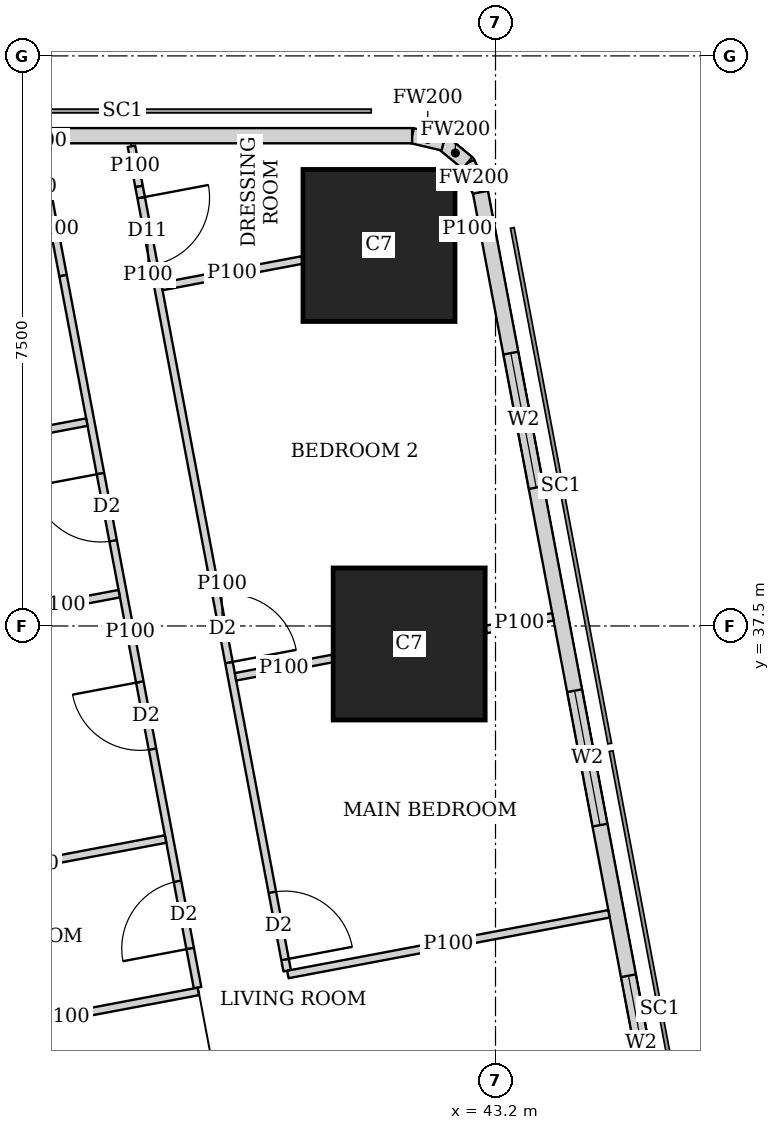
"""IFC4 building model, lengths in metres.
Left out: names, types, materials, properties, quantities, classifications, styles, units other than length and angle.
Written with IfcOpenShell. Run it as: python <this file> out.ifc"""

import sys

from ifc_helpers import new_model, si_unit, direction, frame, frame_2d, origin, origin_2d, place, context, subcontext, project, spatial, rectangle, extrude, element, fill, save


model = new_model("IFC4")
c1 = context("Model", 3, precision=1e-05, world=origin(), true_north=direction((0.0, 1.0)))
c2 = subcontext(c1, "Body", "Model", "MODEL_VIEW")
j1 = project(units=[si_unit("LENGTHUNIT", "METRE"), si_unit("PLANEANGLEUNIT", "RADIAN")], contexts=[c1])
p1 = place(None, origin())
s1 = spatial("IfcSite", under=j1, at=p1, CompositionType="ELEMENT")
p2 = place(p1, origin())
s2 = spatial("IfcBuilding", under=s1, at=p2, CompositionType="ELEMENT")
p3 = place(p2, frame((0.0, 0.0, 277.85)))
s3 = spatial("IfcBuildingStorey", under=s2, at=p3, CompositionType="ELEMENT", Elevation=277.85)
for number, where, z_axis, x_axis in (
    (1, (42.064, 37.263, 0.0), (0.0, 0.0, 1.0), (1.0, 0.0, 0.0)),
    (2, (41.667, 42.506, 0.0), (0.0, 0.0, 1.0), (1.0, 0.0, 0.0)),
):
    element("IfcColumn", number, at=place(p3, frame(where, z_axis=z_axis, x_axis=x_axis)), inside=s3, PredefinedType="COLUMN", context=c2, shape_type="SweptSolid", body=[
        extrude(rectangle(XDim=2.0, YDim=2.0, at=origin_2d()), origin(), (0.0, 0.0, 1.0), 3.75),
    ])
p4 = place(p3, frame((49.684, 7.832, 0.0), z_axis=(0.0, 0.0, 1.0), x_axis=(-0.185616669694, 0.982622232565, 0.0)))
e3 = element("IfcWall", 3, at=p4, inside=s3, PredefinedType="SOLIDWALL", context=c2, shape_type="SweptSolid", body=[
    extrude(rectangle(XDim=36.0, YDim=0.2, at=frame_2d((18.0, 0.0))), origin(), (0.0, 0.0, 1.0), 3.5),
])
p5 = place(p4, frame((2.518, 0.0, 0.9)))
e4 = element("IfcOpeningElement", 4, at=p5, cuts=e3, PredefinedType="OPENING", context=c2, shape_type="SweptSolid", body=[
    extrude(rectangle(XDim=2.4, YDim=1.5, at=frame_2d((1.2, 0.75))), frame((0.0, 0.11, 0.0), z_axis=(0.0, -1.0, 0.0), x_axis=(1.0, 0.0, 0.0)), (0.0, 0.0, 1.0), 0.22),
])
p6 = place(p4, frame((8.444, 0.0, 0.9)))
e5 = element("IfcOpeningElement", 5, at=p6, cuts=e3, PredefinedType="OPENING", context=c2, shape_type="SweptSolid", body=[
    extrude(rectangle(XDim=1.8, YDim=1.5, at=frame_2d((0.9, 0.75))), frame((0.0, 0.11, 0.0), z_axis=(0.0, -1.0, 0.0), x_axis=(1.0, 0.0, 0.0)), (0.0, 0.0, 1.0), 0.22),
])
p7 = place(p4, frame((12.261, 0.0, 0.9)))
e6 = element("IfcOpeningElement", 6, at=p7, cuts=e3, PredefinedType="OPENING", context=c2, shape_type="SweptSolid", body=[
    extrude(rectangle(XDim=1.8, YDim=1.5, at=frame_2d((0.9, 0.75))), frame((0.0, 0.11, 0.0), z_axis=(0.0, -1.0, 0.0), x_axis=(1.0, 0.0, 0.0)), (0.0, 0.0, 1.0), 0.22),
])
p8 = place(p4, frame((16.078, 0.0, 0.9)))
e7 = element("IfcOpeningElement", 7, at=p8, cuts=e3, PredefinedType="OPENING", context=c2, shape_type="SweptSolid", body=[
    extrude(rectangle(XDim=1.8, YDim=1.5, at=frame_2d((0.9, 0.75))), frame((0.0, 0.11, 0.0), z_axis=(0.0, -1.0, 0.0), x_axis=(1.0, 0.0, 0.0)), (0.0, 0.0, 1.0), 0.22),
])
p9 = place(p4, frame((19.894, 0.0, 0.9)))
e8 = element("IfcOpeningElement", 8, at=p9, cuts=e3, PredefinedType="OPENING", context=c2, shape_type="SweptSolid", body=[
    extrude(rectangle(XDim=1.8, YDim=1.5, at=frame_2d((0.9, 0.75))), frame((0.0, 0.11, 0.0), z_axis=(0.0, -1.0, 0.0), x_axis=(1.0, 0.0, 0.0)), (0.0, 0.0, 1.0), 0.22),
])
p10 = place(p4, frame((23.71, 0.0, 0.9)))
e9 = element("IfcOpeningElement", 9, at=p10, cuts=e3, PredefinedType="OPENING", context=c2, shape_type="SweptSolid", body=[
    extrude(rectangle(XDim=1.8, YDim=1.5, at=frame_2d((0.9, 0.75))), frame((0.0, 0.11, 0.0), z_axis=(0.0, -1.0, 0.0), x_axis=(1.0, 0.0, 0.0)), (0.0, 0.0, 1.0), 0.22),
])
p11 = place(p4, frame((27.526, 0.0, 0.9)))
e10 = element("IfcOpeningElement", 10, at=p11, cuts=e3, PredefinedType="OPENING", context=c2, shape_type="SweptSolid", body=[
    extrude(rectangle(XDim=1.8, YDim=1.5, at=frame_2d((0.9, 0.75))), frame((0.0, 0.11, 0.0), z_axis=(0.0, -1.0, 0.0), x_axis=(1.0, 0.0, 0.0)), (0.0, 0.0, 1.0), 0.22),
])
p12 = place(p4, frame((32.046, 0.0, 0.9)))
e11 = element("IfcOpeningElement", 11, at=p12, cuts=e3, PredefinedType="OPENING", context=c2, shape_type="SweptSolid", body=[
    extrude(rectangle(XDim=1.8, YDim=1.5, at=frame_2d((0.9, 0.75))), frame((0.0, 0.11, 0.0), z_axis=(0.0, -1.0, 0.0), x_axis=(1.0, 0.0, 0.0)), (0.0, 0.0, 1.0), 0.22),
])
p13 = place(p3, frame((43.002, 43.206, 0.0), z_axis=(0.0, 0.0, 1.0), x_axis=(-0.40678170573, 0.913525393124, 0.0)))
e12 = element("IfcWall", 12, at=p13, inside=s3, PredefinedType="SOLIDWALL", context=c2, shape_type="SweptSolid", body=[
    extrude(rectangle(XDim=0.423, YDim=0.2, at=frame_2d((0.211, 0.0))), origin(), (0.0, 0.0, 1.0), 3.5),
])
p14 = place(p3, frame((42.83, 43.592, 0.0), z_axis=(0.0, 0.0, 1.0), x_axis=(-0.771190539797, 0.636604391539, 0.0)))
e13 = element("IfcWall", 13, at=p14, inside=s3, PredefinedType="SOLIDWALL", context=c2, shape_type="SweptSolid", body=[
    extrude(rectangle(XDim=0.41, YDim=0.2, at=frame_2d((0.205, 0.0))), origin(), (0.0, 0.0, 1.0), 3.5),
])
p15 = place(p3, frame((42.514, 43.853, 0.0), z_axis=(0.0, 0.0, 1.0), x_axis=(-0.973288080424, 0.229587265555, 0.0)))
e14 = element("IfcWall", 14, at=p15, inside=s3, PredefinedType="SOLIDWALL", context=c2, shape_type="SweptSolid", body=[
    extrude(rectangle(XDim=0.422, YDim=0.2, at=frame_2d((0.211, 0.0))), origin(), (0.0, 0.0, 1.0), 3.5),
])
p16 = place(p3, frame((42.103, 43.95, 0.0), z_axis=(0.0, 0.0, 1.0), x_axis=(-1.0, 0.0, 0.0)))
e15 = element("IfcWall", 15, at=p16, inside=s3, PredefinedType="SOLIDWALL", context=c2, shape_type="SweptSolid", body=[
    extrude(rectangle(XDim=27.54, YDim=0.2, at=frame_2d((13.77, 0.0))), origin(), (0.0, 0.0, 1.0), 3.5),
])
p17 = place(p16, frame((10.603, 0.0, 0.9)))
e16 = element("IfcOpeningElement", 16, at=p17, cuts=e15, PredefinedType="OPENING", context=c2, shape_type="SweptSolid", body=[
    extrude(rectangle(XDim=1.8, YDim=1.5, at=frame_2d((0.9, 0.75))), frame((0.0, 0.11, 0.0), z_axis=(0.0, -1.0, 0.0), x_axis=(1.0, 0.0, 0.0)), (0.0, 0.0, 1.0), 0.22),
])
p18 = place(p16, frame((14.203, 0.0, 0.9)))
e17 = element("IfcOpeningElement", 17, at=p18, cuts=e15, PredefinedType="OPENING", context=c2, shape_type="SweptSolid", body=[
    extrude(rectangle(XDim=1.8, YDim=1.5, at=frame_2d((0.9, 0.75))), frame((0.0, 0.11, 0.0), z_axis=(0.0, -1.0, 0.0), x_axis=(1.0, 0.0, 0.0)), (0.0, 0.0, 1.0), 0.22),
])
p19 = place(p16, frame((17.803, 0.0, 0.9)))
e18 = element("IfcOpeningElement", 18, at=p19, cuts=e15, PredefinedType="OPENING", context=c2, shape_type="SweptSolid", body=[
    extrude(rectangle(XDim=1.8, YDim=1.5, at=frame_2d((0.9, 0.75))), frame((0.0, 0.11, 0.0), z_axis=(0.0, -1.0, 0.0), x_axis=(1.0, 0.0, 0.0)), (0.0, 0.0, 1.0), 0.22),
])
p20 = place(p16, frame((22.822, 0.0, 0.9)))
e19 = element("IfcOpeningElement", 19, at=p20, cuts=e15, PredefinedType="OPENING", context=c2, shape_type="SweptSolid", body=[
    extrude(rectangle(XDim=2.4, YDim=1.5, at=frame_2d((1.2, 0.75))), frame((0.0, 0.11, 0.0), z_axis=(0.0, -1.0, 0.0), x_axis=(1.0, 0.0, 0.0)), (0.0, 0.0, 1.0), 0.22),
])
p21 = place(p3, frame((33.781, 42.186, 0.0), z_axis=(0.0, 0.0, 1.0), x_axis=(0.185593518645, -0.9826266055, 0.0)))
e20 = element("IfcWall", 20, at=p21, inside=s3, PredefinedType="SOLIDWALL", context=c2, shape_type="SweptSolid", body=[
    extrude(rectangle(XDim=35.961, YDim=0.15, at=frame_2d((17.98, 0.0))), origin(), (0.0, 0.0, 1.0), 2.5),
])
p22 = place(p21, frame((11.76, 0.0, 0.0)))
e21 = element("IfcOpeningElement", 21, at=p22, cuts=e20, PredefinedType="OPENING", context=c2, shape_type="SweptSolid", body=[
    extrude(rectangle(XDim=1.0, YDim=2.1, at=frame_2d((0.5, 1.05))), frame((0.0, 0.085, 0.0), z_axis=(0.0, -1.0, 0.0), x_axis=(1.0, 0.0, 0.0)), (0.0, 0.0, 1.0), 0.17),
])
p23 = place(p21, frame((15.576, 0.0, 0.0)))
e22 = element("IfcOpeningElement", 22, at=p23, cuts=e20, PredefinedType="OPENING", context=c2, shape_type="SweptSolid", body=[
    extrude(rectangle(XDim=1.0, YDim=2.1, at=frame_2d((0.5, 1.05))), frame((0.0, 0.085, 0.0), z_axis=(0.0, -1.0, 0.0), x_axis=(1.0, 0.0, 0.0)), (0.0, 0.0, 1.0), 0.17),
])
p24 = place(p21, frame((30.502, 0.0, 0.0)))
e23 = element("IfcOpeningElement", 23, at=p24, cuts=e20, PredefinedType="OPENING", context=c2, shape_type="SweptSolid", body=[
    extrude(rectangle(XDim=1.0, YDim=2.1, at=frame_2d((0.5, 1.05))), frame((0.0, 0.085, 0.0), z_axis=(0.0, -1.0, 0.0), x_axis=(1.0, 0.0, 0.0)), (0.0, 0.0, 1.0), 0.17),
])
p25 = place(p3, frame((38.41, 43.811, 0.0), z_axis=(0.0, 0.0, 1.0), x_axis=(0.185903499302, -0.982568007289, 0.0)))
e24 = element("IfcWall", 24, at=p25, inside=s3, PredefinedType="PARTITIONING", context=c2, shape_type="SweptSolid", body=[
    extrude(rectangle(XDim=0.538, YDim=0.1, at=frame_2d((0.269, 0.0))), origin(), (0.0, 0.0, 1.0), 3.5),
])
p26 = place(p3, frame((38.51, 43.282, 0.0), z_axis=(0.0, 0.0, 1.0), x_axis=(0.185775287495, -0.982592256511, 0.0)))
e25 = element("IfcWall", 25, at=p26, inside=s3, PredefinedType="PARTITIONING", context=c2, shape_type="SweptSolid", body=[
    extrude(rectangle(XDim=1.259, YDim=0.1, at=frame_2d((0.629, 0.0))), origin(), (0.0, 0.0, 1.0), 2.05),
])
p27 = place(p26, frame((0.15, 0.0, 0.0)))
e26 = element("IfcOpeningElement", 26, at=p27, cuts=e25, PredefinedType="OPENING", context=c2, shape_type="SweptSolid", body=[
    extrude(rectangle(XDim=0.9, YDim=2.0, at=frame_2d((0.45, 1.0))), frame((0.0, 0.06, 0.0), z_axis=(0.0, -1.0, 0.0), x_axis=(1.0, 0.0, 0.0)), (0.0, 0.0, 1.0), 0.12),
])
p28 = place(p3, frame((38.744, 42.045, 0.0), z_axis=(0.0, 0.0, 1.0), x_axis=(0.185588352162, -0.982627581305, 0.0)))
e27 = element("IfcWall", 27, at=p28, inside=s3, PredefinedType="PARTITIONING", context=c2, shape_type="SweptSolid", body=[
    extrude(rectangle(XDim=9.241, YDim=0.1, at=frame_2d((4.621, 0.0))), origin(), (0.0, 0.0, 1.0), 3.5),
])
p29 = place(p28, frame((8.191, 0.0, 0.0)))
e28 = element("IfcOpeningElement", 28, at=p29, cuts=e27, PredefinedType="OPENING", context=c2, shape_type="SweptSolid", body=[
    extrude(rectangle(XDim=0.9, YDim=2.1, at=frame_2d((0.45, 1.05))), frame((0.0, 0.06, 0.0), z_axis=(0.0, -1.0, 0.0), x_axis=(1.0, 0.0, 0.0)), (0.0, 0.0, 1.0), 0.12),
])
p30 = place(p28, frame((4.215, 0.0, 0.0)))
e29 = element("IfcOpeningElement", 29, at=p30, cuts=e27, PredefinedType="OPENING", context=c2, shape_type="SweptSolid", body=[
    extrude(rectangle(XDim=0.9, YDim=2.1, at=frame_2d((0.45, 1.05))), frame((0.0, 0.06, 0.0), z_axis=(0.0, -1.0, 0.0), x_axis=(1.0, 0.0, 0.0)), (0.0, 0.0, 1.0), 0.12),
])
p31 = place(p3, frame((37.276, 43.346, 0.0), z_axis=(0.0, 0.0, 1.0), x_axis=(0.185962504646, -0.982556841544, 0.0)))
e30 = element("IfcWall", 30, at=p31, inside=s3, PredefinedType="PARTITIONING", context=c2, shape_type="SweptSolid", body=[
    extrude(rectangle(XDim=1.259, YDim=0.1, at=frame_2d((0.629, 0.0))), origin(), (0.0, 0.0, 1.0), 2.05),
])
p32 = place(p3, frame((37.51, 42.109, 0.0), z_axis=(0.0, 0.0, 1.0), x_axis=(0.185659798122, -0.982614084654, 0.0)))
e31 = element("IfcWall", 31, at=p32, inside=s3, PredefinedType="PARTITIONING", context=c2, shape_type="SweptSolid", body=[
    extrude(rectangle(XDim=9.534, YDim=0.1, at=frame_2d((4.767, 0.0))), origin(), (0.0, 0.0, 1.0), 3.5),
])
p33 = place(p32, frame((8.109, 0.0, 0.0)))
e32 = element("IfcOpeningElement", 32, at=p33, cuts=e31, PredefinedType="OPENING", context=c2, shape_type="SweptSolid", body=[
    extrude(rectangle(XDim=0.9, YDim=2.1, at=frame_2d((0.45, 1.05))), frame((0.0, 0.06, 0.0), z_axis=(0.0, -1.0, 0.0), x_axis=(1.0, 0.0, 0.0)), (0.0, 0.0, 1.0), 0.12),
])
p34 = place(p32, frame((2.65, 0.0, 0.0)))
e33 = element("IfcOpeningElement", 33, at=p34, cuts=e31, PredefinedType="OPENING", context=c2, shape_type="SweptSolid", body=[
    extrude(rectangle(XDim=0.9, YDim=2.1, at=frame_2d((0.45, 1.05))), frame((0.0, 0.06, 0.0), z_axis=(0.0, -1.0, 0.0), x_axis=(1.0, 0.0, 0.0)), (0.0, 0.0, 1.0), 0.12),
])
p35 = place(p32, frame((5.44, 0.0, 0.0)))
e34 = element("IfcOpeningElement", 34, at=p35, cuts=e31, PredefinedType="OPENING", context=c2, shape_type="SweptSolid", body=[
    extrude(rectangle(XDim=0.9, YDim=2.1, at=frame_2d((0.45, 1.05))), frame((0.0, 0.06, 0.0), z_axis=(0.0, -1.0, 0.0), x_axis=(1.0, 0.0, 0.0)), (0.0, 0.0, 1.0), 0.12),
])
p36 = place(p3, frame((42.985, 42.755, 0.0), z_axis=(0.0, 0.0, 1.0), x_axis=(-0.98281924824, -0.184570651215, 0.0)))
e35 = element("IfcWall", 35, at=p36, inside=s3, PredefinedType="PARTITIONING", context=c2, shape_type="SweptSolid", body=[
    extrude(rectangle(XDim=0.313, YDim=0.1, at=frame_2d((0.157, 0.0))), origin(), (0.0, 0.0, 1.0), 3.5),
])
p37 = place(p3, frame((40.657, 42.315, 0.0), z_axis=(0.0, 0.0, 1.0), x_axis=(-0.982640672055, -0.185519027661, 0.0)))
e36 = element("IfcWall", 36, at=p37, inside=s3, PredefinedType="PARTITIONING", context=c2, shape_type="SweptSolid", body=[
    extrude(rectangle(XDim=1.881, YDim=0.1, at=frame_2d((0.94, 0.0))), origin(), (0.0, 0.0, 1.0), 2.05),
])
p38 = place(p3, frame((43.955, 37.62, 0.0), z_axis=(0.0, 0.0, 1.0), x_axis=(-0.982708424405, -0.18515980288, 0.0)))
e37 = element("IfcWall", 37, at=p38, inside=s3, PredefinedType="PARTITIONING", context=c2, shape_type="SweptSolid", body=[
    extrude(rectangle(XDim=0.897, YDim=0.1, at=frame_2d((0.448, 0.0))), origin(), (0.0, 0.0, 1.0), 3.5),
])
p39 = place(p3, frame((41.054, 37.072, 0.0), z_axis=(0.0, 0.0, 1.0), x_axis=(-0.982602741717, -0.185719821156, 0.0)))
e38 = element("IfcWall", 38, at=p39, inside=s3, PredefinedType="PARTITIONING", context=c2, shape_type="SweptSolid", body=[
    extrude(rectangle(XDim=1.297, YDim=0.1, at=frame_2d((0.649, 0.0))), origin(), (0.0, 0.0, 1.0), 3.5),
])
p40 = place(p3, frame((44.693, 33.713, 0.0), z_axis=(0.0, 0.0, 1.0), x_axis=(-0.982633535512, -0.185556823879, 0.0)))
e39 = element("IfcWall", 39, at=p40, inside=s3, PredefinedType="PARTITIONING", context=c2, shape_type="SweptSolid", body=[
    extrude(rectangle(XDim=4.3, YDim=0.1, at=frame_2d((2.15, 0.0))), origin(), (0.0, 0.0, 1.0), 2.5),
])
p41 = place(p3, frame((37.823, 40.182, 0.0), z_axis=(0.0, 0.0, 1.0), x_axis=(-0.98263926043, -0.185526504472, 0.0)))
e40 = element("IfcWall", 40, at=p41, inside=s3, PredefinedType="PARTITIONING", context=c2, shape_type="SweptSolid", body=[
    extrude(rectangle(XDim=3.524, YDim=0.1, at=frame_2d((1.762, 0.0))), origin(), (0.0, 0.0, 1.0), 3.5),
])
p42 = place(p3, frame((38.25, 37.925, 0.0), z_axis=(0.0, 0.0, 1.0), x_axis=(-0.982610209589, -0.185680305934, 0.0)))
e41 = element("IfcWall", 41, at=p42, inside=s3, PredefinedType="PARTITIONING", context=c2, shape_type="SweptSolid", body=[
    extrude(rectangle(XDim=1.567, YDim=0.1, at=frame_2d((0.784, 0.0))), origin(), (0.0, 0.0, 1.0), 3.5),
])
p43 = place(p3, frame((39.289, 32.692, 0.0), z_axis=(0.0, 0.0, 1.0), x_axis=(-0.982662827464, -0.185401638399, 0.0)))
e42 = element("IfcWall", 42, at=p43, inside=s3, PredefinedType="PARTITIONING", context=c2, shape_type="SweptSolid", body=[
    extrude(rectangle(XDim=3.575, YDim=0.1, at=frame_2d((1.788, 0.0))), origin(), (0.0, 0.0, 1.0), 3.5),
])
p44 = place(p3, frame((38.859, 34.697, 0.0), z_axis=(0.0, 0.0, 1.0), x_axis=(-0.982626628545, -0.185593396635, 0.0)))
e43 = element("IfcWall", 43, at=p44, inside=s3, PredefinedType="PARTITIONING", context=c2, shape_type="SweptSolid", body=[
    extrude(rectangle(XDim=3.524, YDim=0.1, at=frame_2d((1.762, 0.0))), origin(), (0.0, 0.0, 1.0), 3.5),
])
p45 = place(p3, frame((37.947, 10.163, 0.0), z_axis=(0.0, 0.0, 1.0), x_axis=(-0.185572770922, 0.982630523998, 0.0)))
e44 = element("IfcWall", 44, at=p45, inside=s3, PredefinedType="PARTITIONING", context=c2, shape_type="SweptSolid", body=[
    extrude(rectangle(XDim=25.111, YDim=0.125, at=frame_2d((12.556, 0.0))), origin(), (0.0, 0.0, 1.0), 2.5),
])
p46 = place(p45, frame((0.708, 0.0, 0.0)))
e45 = element("IfcOpeningElement", 45, at=p46, cuts=e44, PredefinedType="OPENING", context=c2, shape_type="SweptSolid", body=[
    extrude(rectangle(XDim=1.0, YDim=2.1, at=frame_2d((0.5, 1.05))), frame((0.0, 0.073, 0.0), z_axis=(0.0, -1.0, 0.0), x_axis=(1.0, 0.0, 0.0)), (0.0, 0.0, 1.0), 0.145),
])
p47 = place(p45, frame((5.9, 0.0, 0.0)))
e46 = element("IfcOpeningElement", 46, at=p47, cuts=e44, PredefinedType="OPENING", context=c2, shape_type="SweptSolid", body=[
    extrude(rectangle(XDim=1.0, YDim=2.1, at=frame_2d((0.5, 1.05))), frame((0.0, 0.073, 0.0), z_axis=(0.0, -1.0, 0.0), x_axis=(1.0, 0.0, 0.0)), (0.0, 0.0, 1.0), 0.145),
])
p48 = place(p45, frame((13.378, 0.0, 0.0)))
e47 = element("IfcOpeningElement", 47, at=p48, cuts=e44, PredefinedType="OPENING", context=c2, shape_type="SweptSolid", body=[
    extrude(rectangle(XDim=1.0, YDim=2.1, at=frame_2d((0.5, 1.05))), frame((0.0, 0.073, 0.0), z_axis=(0.0, -1.0, 0.0), x_axis=(1.0, 0.0, 0.0)), (0.0, 0.0, 1.0), 0.145),
])
p49 = place(p45, frame((21.15, 0.0, 0.0)))
e48 = element("IfcOpeningElement", 48, at=p49, cuts=e44, PredefinedType="OPENING", context=c2, shape_type="SweptSolid", body=[
    extrude(rectangle(XDim=1.0, YDim=2.1, at=frame_2d((0.5, 1.05))), frame((0.0, 0.073, 0.0), z_axis=(0.0, -1.0, 0.0), x_axis=(1.0, 0.0, 0.0)), (0.0, 0.0, 1.0), 0.145),
])
p50 = place(p10, origin())
e49 = element("IfcWindow", 49, at=p50, inside=s3, PartitioningType="SINGLE_PANEL", PredefinedType="WINDOW", context=c2, shape_type="SweptSolid", body=[
    extrude(rectangle(XDim=1.8, YDim=1.5, at=frame_2d((0.9, 0.75))), frame((0.0, 0.03, 0.0), z_axis=(0.0, -1.0, 0.0), x_axis=(1.0, 0.0, 0.0)), (0.0, 0.0, 1.0), 0.06),
])
fill(e9, e49)
p51 = place(p11, origin())
e50 = element("IfcWindow", 50, at=p51, inside=s3, PartitioningType="SINGLE_PANEL", PredefinedType="WINDOW", context=c2, shape_type="SweptSolid", body=[
    extrude(rectangle(XDim=1.8, YDim=1.5, at=frame_2d((0.9, 0.75))), frame((0.0, 0.03, 0.0), z_axis=(0.0, -1.0, 0.0), x_axis=(1.0, 0.0, 0.0)), (0.0, 0.0, 1.0), 0.06),
])
fill(e10, e50)
p52 = place(p12, origin())
e51 = element("IfcWindow", 51, at=p52, inside=s3, PartitioningType="SINGLE_PANEL", PredefinedType="WINDOW", context=c2, shape_type="SweptSolid", body=[
    extrude(rectangle(XDim=1.8, YDim=1.5, at=frame_2d((0.9, 0.75))), frame((0.0, 0.03, 0.0), z_axis=(0.0, -1.0, 0.0), x_axis=(1.0, 0.0, 0.0)), (0.0, 0.0, 1.0), 0.06),
])
fill(e11, e51)
p53 = place(p27, origin())
e52 = element("IfcDoor", 52, at=p53, inside=s3, OperationType="SINGLE_SWING_LEFT", PredefinedType="DOOR", context=c2, shape_type="SweptSolid", body=[
    extrude(rectangle(XDim=0.9, YDim=2.0, at=frame_2d((0.45, 1.0))), frame((0.0, 0.025, 0.0), z_axis=(0.0, -1.0, 0.0), x_axis=(1.0, 0.0, 0.0)), (0.0, 0.0, 1.0), 0.05),
])
fill(e26, e52)
p54 = place(p29, origin())
e53 = element("IfcDoor", 53, at=p54, inside=s3, OperationType="SINGLE_SWING_RIGHT", PredefinedType="DOOR", context=c2, shape_type="SweptSolid", body=[
    extrude(rectangle(XDim=0.9, YDim=2.1, at=frame_2d((0.45, 1.05))), frame((0.0, 0.025, 0.0), z_axis=(0.0, -1.0, 0.0), x_axis=(1.0, 0.0, 0.0)), (0.0, 0.0, 1.0), 0.05),
])
fill(e28, e53)
p55 = place(p30, origin())
e54 = element("IfcDoor", 54, at=p55, inside=s3, OperationType="SINGLE_SWING_RIGHT", PredefinedType="DOOR", context=c2, shape_type="SweptSolid", body=[
    extrude(rectangle(XDim=0.9, YDim=2.1, at=frame_2d((0.45, 1.05))), frame((0.0, 0.025, 0.0), z_axis=(0.0, -1.0, 0.0), x_axis=(1.0, 0.0, 0.0)), (0.0, 0.0, 1.0), 0.05),
])
fill(e29, e54)
p56 = place(p33, origin())
e55 = element("IfcDoor", 55, at=p56, inside=s3, OperationType="SINGLE_SWING_LEFT", PredefinedType="DOOR", context=c2, shape_type="SweptSolid", body=[
    extrude(rectangle(XDim=0.9, YDim=2.1, at=frame_2d((0.45, 1.05))), frame((0.0, 0.025, 0.0), z_axis=(0.0, -1.0, 0.0), x_axis=(1.0, 0.0, 0.0)), (0.0, 0.0, 1.0), 0.05),
])
fill(e32, e55)
p57 = place(p34, origin())
e56 = element("IfcDoor", 56, at=p57, inside=s3, OperationType="SINGLE_SWING_RIGHT", PredefinedType="DOOR", context=c2, shape_type="SweptSolid", body=[
    extrude(rectangle(XDim=0.9, YDim=2.1, at=frame_2d((0.45, 1.05))), frame((0.0, 0.025, 0.0), z_axis=(0.0, -1.0, 0.0), x_axis=(1.0, 0.0, 0.0)), (0.0, 0.0, 1.0), 0.05),
])
fill(e33, e56)
p58 = place(p35, origin())
e57 = element("IfcDoor", 57, at=p58, inside=s3, OperationType="SINGLE_SWING_RIGHT", PredefinedType="DOOR", context=c2, shape_type="SweptSolid", body=[
    extrude(rectangle(XDim=0.9, YDim=2.1, at=frame_2d((0.45, 1.05))), frame((0.0, 0.025, 0.0), z_axis=(0.0, -1.0, 0.0), x_axis=(1.0, 0.0, 0.0)), (0.0, 0.0, 1.0), 0.05),
])
fill(e34, e57)
save(model, sys.argv[1])
